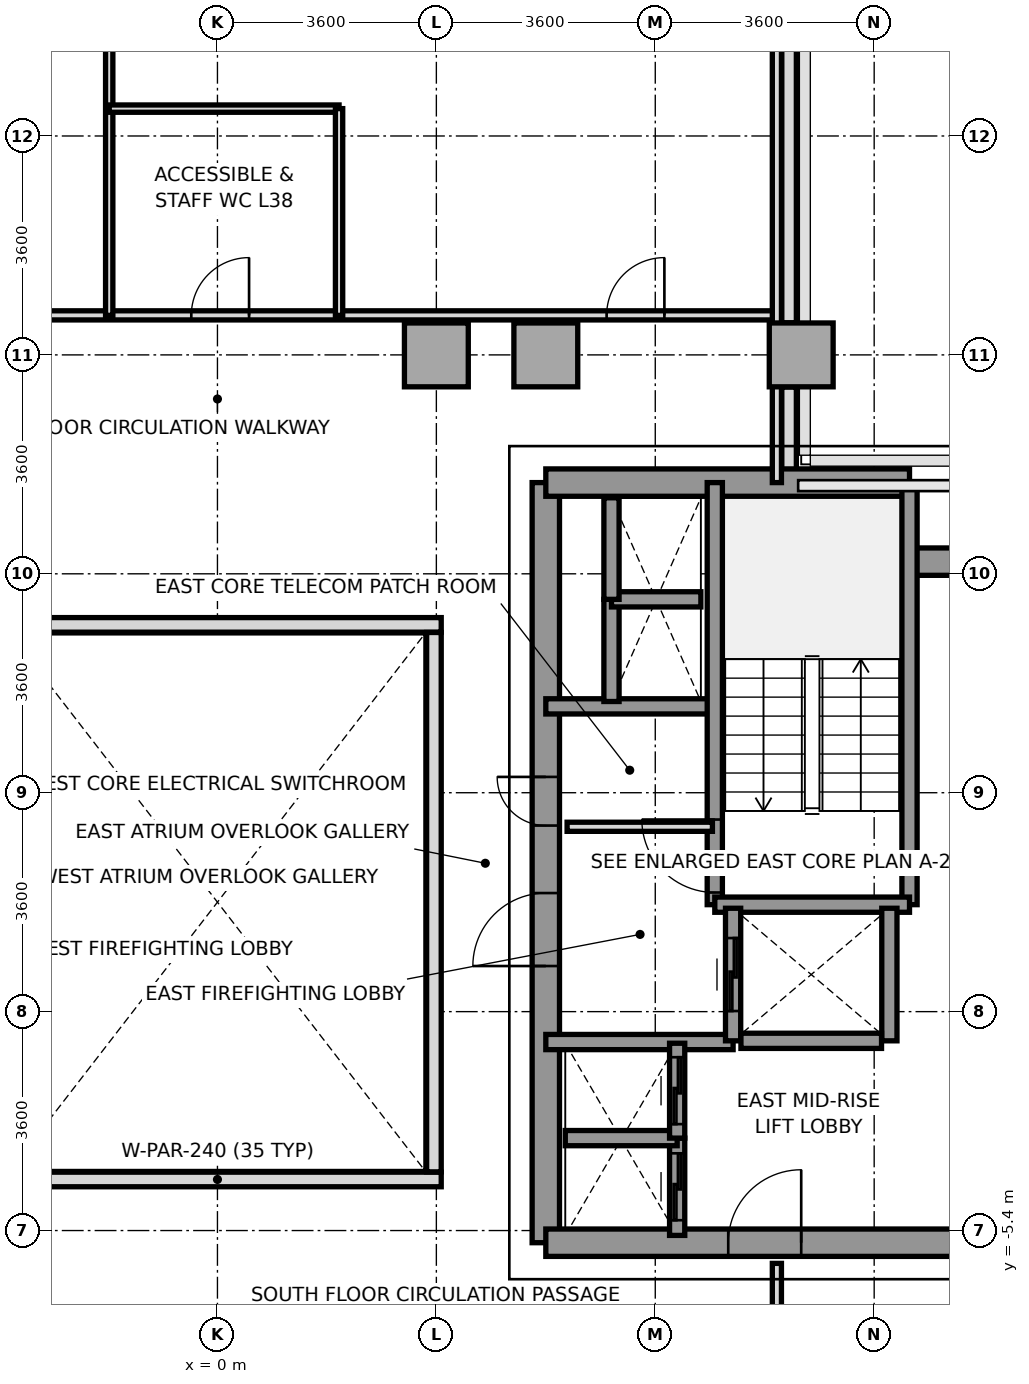
"""IFC4 building model, lengths in metres.
Left out: names, types, materials, properties, quantities, classifications, styles, units other than length and angle.
Written with IfcOpenShell. Run it as: python <this file> out.ifc"""

import sys

from ifc_helpers import new_model, si_unit, direction, frame, frame_2d, origin, origin_2d, place, context, subcontext, project, spatial, rectangle, extrude, source, transform, mapped, element, fill, save


model = new_model("IFC4")
c1 = context("Model", 3, precision=1e-05, world=origin(), true_north=direction((0.0, 1.0)))
c2 = subcontext(c1, "Body", "Model", "MODEL_VIEW")
j1 = project(units=[si_unit("LENGTHUNIT", "METRE"), si_unit("PLANEANGLEUNIT", "RADIAN")], contexts=[c1])
p1 = place(None, origin())
s1 = spatial("IfcSite", under=j1, at=p1, CompositionType="ELEMENT")
p2 = place(p1, origin())
s2 = spatial("IfcBuilding", under=s1, at=p2, CompositionType="ELEMENT")
p3 = place(p2, frame((0.0, 0.0, 141.4)))
s3 = spatial("IfcBuildingStorey", under=s2, at=p3, CompositionType="ELEMENT", Elevation=141.4)
m1 = source(origin(), c2, "Body", "SweptSolid", [
    extrude(rectangle(XDim=1.05, YDim=1.05, at=origin_2d()), origin(), (0.0, 0.0, 1.0), 3.2),
])
for number, where, z_axis, x_axis in (
    (1, (3.6, 9.0, 0.0), (0.0, 0.0, 1.0), (1.0, 0.0, 0.0)),
    (2, (5.4, 9.0, 0.0), (0.0, 0.0, 1.0), (1.0, 0.0, 0.0)),
    (3, (9.6, 9.0, 0.0), (0.0, 0.0, 1.0), (1.0, 0.0, 0.0)),
):
    element("IfcColumn", number, at=place(p3, frame(where, z_axis=z_axis, x_axis=x_axis)), inside=s3, PredefinedType="COLUMN", context=c2, shape_type="MappedRepresentation", body=[
        mapped(m1, transform((0.0, 0.0, 0.0), x_axis=(1.0, 0.0, 0.0), y_axis=(0.0, 1.0, 0.0), z_axis=(0.0, 0.0, 1.0), scale=1.0)),
    ])
p4 = place(p3, frame((9.4, 15.358, 0.0), z_axis=(0.0, 0.0, 1.0), x_axis=(0.0, -1.0, 0.0)))
e4 = element("IfcWall", 4, at=p4, inside=s3, PredefinedType="PARAPET", context=c2, shape_type="SweptSolid", body=[
    extrude(rectangle(XDim=5.83, YDim=0.24, at=frame_2d((2.915, 0.0))), origin(), (0.0, 0.0, 1.0), 1.15),
])
p5 = place(p3, frame((9.4, 8.472, 0.0), z_axis=(0.0, 0.0, 1.0), x_axis=(0.0, -1.0, 0.0)))
e5 = element("IfcWall", 5, at=p5, inside=s3, PredefinedType="PARAPET", context=c2, shape_type="SweptSolid", body=[
    extrude(rectangle(XDim=1.519, YDim=0.24, at=frame_2d((0.76, 0.0))), origin(), (0.0, 0.0, 1.0), 1.15),
])
p6 = place(p3, frame((5.4, -5.6, 0.0), z_axis=(0.0, 0.0, 1.0), x_axis=(0.0, 1.0, 0.0)))
e6 = element("IfcWall", 6, at=p6, inside=s3, PredefinedType="SHEAR", context=c2, shape_type="SweptSolid", body=[
    extrude(rectangle(XDim=12.5, YDim=0.45, at=frame_2d((6.25, 0.0))), origin(), (0.0, 0.0, 1.0), 3.2),
])
p7 = place(p6, frame((4.55, 0.0, 0.0)))
e7 = element("IfcOpeningElement", 7, at=p7, cuts=e6, PredefinedType="OPENING", context=c2, shape_type="SweptSolid", body=[
    extrude(rectangle(XDim=1.2, YDim=2.2, at=frame_2d((0.6, 1.1))), frame((0.0, 0.235, 0.0), z_axis=(0.0, -1.0, 0.0), x_axis=(1.0, 0.0, 0.0)), (0.0, 0.0, 1.0), 0.47),
])
p8 = place(p6, frame((6.86, 0.0, 0.0)))
e8 = element("IfcOpeningElement", 8, at=p8, cuts=e6, PredefinedType="OPENING", context=c2, shape_type="SweptSolid", body=[
    extrude(rectangle(XDim=0.8, YDim=2.1, at=frame_2d((0.4, 1.05))), frame((0.0, 0.235, 0.0), z_axis=(0.0, -1.0, 0.0), x_axis=(1.0, 0.0, 0.0)), (0.0, 0.0, 1.0), 0.47),
])
p9 = place(p3, frame((5.4, 6.9, 0.0), z_axis=(0.0, 0.0, 1.0), x_axis=(1.0, 0.0, 0.0)))
e9 = element("IfcWall", 9, at=p9, inside=s3, PredefinedType="SHEAR", context=c2, shape_type="SweptSolid", body=[
    extrude(rectangle(XDim=5.981, YDim=0.45, at=frame_2d((2.991, 0.0))), origin(), (0.0, 0.0, 1.0), 3.2),
])
p10 = place(p3, frame((11.381, 5.6, 0.0), z_axis=(0.0, 0.0, 1.0), x_axis=(1.0, 0.0, 0.0)))
e10 = element("IfcWall", 10, at=p10, inside=s3, PredefinedType="SHEAR", context=c2, shape_type="SweptSolid", body=[
    extrude(rectangle(XDim=1.819, YDim=0.45, at=frame_2d((0.909, 0.0))), origin(), (0.0, 0.0, 1.0), 3.2),
])
p11 = place(p3, frame((5.4, -5.6, 0.0), z_axis=(0.0, 0.0, 1.0), x_axis=(1.0, 0.0, 0.0)))
e11 = element("IfcWall", 11, at=p11, inside=s3, PredefinedType="SHEAR", context=c2, shape_type="SweptSolid", body=[
    extrude(rectangle(XDim=7.8, YDim=0.45, at=frame_2d((3.9, 0.0))), origin(), (0.0, 0.0, 1.0), 3.2),
])
p12 = place(p11, frame((3.0, 0.0, 0.0)))
e12 = element("IfcOpeningElement", 12, at=p12, cuts=e11, PredefinedType="OPENING", context=c2, shape_type="SweptSolid", body=[
    extrude(rectangle(XDim=1.2, YDim=2.2, at=frame_2d((0.6, 1.1))), frame((0.0, 0.235, 0.0), z_axis=(0.0, -1.0, 0.0), x_axis=(1.0, 0.0, 0.0)), (0.0, 0.0, 1.0), 0.47),
])
p13 = place(p3, frame((5.4, 3.22, 0.0), z_axis=(0.0, 0.0, 1.0), x_axis=(1.0, 0.0, 0.0)))
e13 = element("IfcWall", 13, at=p13, inside=s3, PredefinedType="SOLIDWALL", context=c2, shape_type="SweptSolid", body=[
    extrude(rectangle(XDim=2.78, YDim=0.25, at=frame_2d((1.39, 0.0))), origin(), (0.0, 0.0, 1.0), 3.2),
])
p14 = place(p3, frame((5.4, -2.3, 0.0), z_axis=(0.0, 0.0, 1.0), x_axis=(1.0, 0.0, 0.0)))
e14 = element("IfcWall", 14, at=p14, inside=s3, PredefinedType="SOLIDWALL", context=c2, shape_type="SweptSolid", body=[
    extrude(rectangle(XDim=3.08, YDim=0.25, at=frame_2d((1.54, 0.0))), origin(), (0.0, 0.0, 1.0), 3.2),
])
p15 = place(p3, frame((8.179, -0.041, 0.0), z_axis=(0.0, 0.0, 1.0), x_axis=(0.0, 1.0, 0.0)))
e15 = element("IfcWall", 15, at=p15, inside=s3, PredefinedType="SOLIDWALL", context=c2, shape_type="SweptSolid", body=[
    extrude(rectangle(XDim=6.941, YDim=0.25, at=frame_2d((3.47, 0.0))), origin(), (0.0, 0.0, 1.0), 3.2),
])
p16 = place(p15, frame((0.2, 0.0, 0.0)))
e16 = element("IfcOpeningElement", 16, at=p16, cuts=e15, PredefinedType="OPENING", context=c2, shape_type="SweptSolid", body=[
    extrude(rectangle(XDim=1.2, YDim=2.2, at=frame_2d((0.6, 1.1))), frame((0.0, 0.135, 0.0), z_axis=(0.0, -1.0, 0.0), x_axis=(1.0, 0.0, 0.0)), (0.0, 0.0, 1.0), 0.27),
])
p17 = place(p3, frame((11.381, -0.041, 0.0), z_axis=(0.0, 0.0, 1.0), x_axis=(0.0, 1.0, 0.0)))
e17 = element("IfcWall", 17, at=p17, inside=s3, PredefinedType="SOLIDWALL", context=c2, shape_type="SweptSolid", body=[
    extrude(rectangle(XDim=6.941, YDim=0.25, at=frame_2d((3.47, 0.0))), origin(), (0.0, 0.0, 1.0), 3.2),
])
p18 = place(p3, frame((8.179, -0.041, 0.0), z_axis=(0.0, 0.0, 1.0), x_axis=(1.0, 0.0, 0.0)))
e18 = element("IfcWall", 18, at=p18, inside=s3, PredefinedType="SOLIDWALL", context=c2, shape_type="SweptSolid", body=[
    extrude(rectangle(XDim=3.202, YDim=0.25, at=frame_2d((1.601, 0.0))), origin(), (0.0, 0.0, 1.0), 3.2),
])
p19 = place(p3, frame((8.48, -2.28, 0.0), z_axis=(0.0, 0.0, 1.0), x_axis=(0.0, 1.0, 0.0)))
e19 = element("IfcWall", 19, at=p19, inside=s3, PredefinedType="SOLIDWALL", context=c2, shape_type="SweptSolid", body=[
    extrude(rectangle(XDim=2.18, YDim=0.25, at=frame_2d((1.09, 0.0))), origin(), (0.0, 0.0, 1.0), 3.2),
])
p20 = place(p19, frame((0.49, 0.0, 0.0)))
e20 = element("IfcOpeningElement", 20, at=p20, cuts=e19, PredefinedType="OPENING", context=c2, shape_type="SweptSolid", body=[
    extrude(rectangle(XDim=1.2, YDim=2.2, at=frame_2d((0.6, 1.1))), frame((0.0, 0.135, 0.0), z_axis=(0.0, -1.0, 0.0), x_axis=(1.0, 0.0, 0.0)), (0.0, 0.0, 1.0), 0.27),
])
p21 = place(p3, frame((11.05, -2.28, 0.0), z_axis=(0.0, 0.0, 1.0), x_axis=(0.0, 1.0, 0.0)))
e21 = element("IfcWall", 21, at=p21, inside=s3, PredefinedType="SOLIDWALL", context=c2, shape_type="SweptSolid", body=[
    extrude(rectangle(XDim=2.18, YDim=0.25, at=frame_2d((1.09, 0.0))), origin(), (0.0, 0.0, 1.0), 3.2),
])
p22 = place(p3, frame((8.609, -2.28, 0.0), z_axis=(0.0, 0.0, 1.0), x_axis=(1.0, 0.0, 0.0)))
e22 = element("IfcWall", 22, at=p22, inside=s3, PredefinedType="SOLIDWALL", context=c2, shape_type="SweptSolid", body=[
    extrude(rectangle(XDim=2.312, YDim=0.25, at=frame_2d((1.156, 0.0))), origin(), (0.0, 0.0, 1.0), 3.2),
])
p23 = place(p3, frame((7.56, -5.48, 0.0), z_axis=(0.0, 0.0, 1.0), x_axis=(0.0, 1.0, 0.0)))
e23 = element("IfcWall", 23, at=p23, inside=s3, PredefinedType="SOLIDWALL", context=c2, shape_type="SweptSolid", body=[
    extrude(rectangle(XDim=1.6, YDim=0.25, at=frame_2d((0.8, 0.0))), origin(), (0.0, 0.0, 1.0), 3.2),
])
p24 = place(p23, frame((0.25, 0.0, 0.0)))
e24 = element("IfcOpeningElement", 24, at=p24, cuts=e23, PredefinedType="OPENING", context=c2, shape_type="SweptSolid", body=[
    extrude(rectangle(XDim=1.1, YDim=2.2, at=frame_2d((0.55, 1.1))), frame((0.0, 0.135, 0.0), z_axis=(0.0, -1.0, 0.0), x_axis=(1.0, 0.0, 0.0)), (0.0, 0.0, 1.0), 0.27),
])
p25 = place(p3, frame((5.72, -3.88, 0.0), z_axis=(0.0, 0.0, 1.0), x_axis=(1.0, 0.0, 0.0)))
e25 = element("IfcWall", 25, at=p25, inside=s3, PredefinedType="SOLIDWALL", context=c2, shape_type="SweptSolid", body=[
    extrude(rectangle(XDim=1.84, YDim=0.25, at=frame_2d((0.92, 0.0))), origin(), (0.0, 0.0, 1.0), 3.2),
])
p26 = place(p3, frame((7.56, -3.88, 0.0), z_axis=(0.0, 0.0, 1.0), x_axis=(0.0, 1.0, 0.0)))
e26 = element("IfcWall", 26, at=p26, inside=s3, PredefinedType="SOLIDWALL", context=c2, shape_type="SweptSolid", body=[
    extrude(rectangle(XDim=1.56, YDim=0.25, at=frame_2d((0.78, 0.0))), origin(), (0.0, 0.0, 1.0), 3.2),
])
p27 = place(p26, frame((0.23, 0.0, 0.0)))
e27 = element("IfcOpeningElement", 27, at=p27, cuts=e26, PredefinedType="OPENING", context=c2, shape_type="SweptSolid", body=[
    extrude(rectangle(XDim=1.1, YDim=2.2, at=frame_2d((0.55, 1.1))), frame((0.0, 0.135, 0.0), z_axis=(0.0, -1.0, 0.0), x_axis=(1.0, 0.0, 0.0)), (0.0, 0.0, 1.0), 0.27),
])
p28 = place(p3, frame((6.48, 3.3, 0.0), z_axis=(0.0, 0.0, 1.0), x_axis=(0.0, 1.0, 0.0)))
e28 = element("IfcWall", 28, at=p28, inside=s3, PredefinedType="SOLIDWALL", context=c2, shape_type="SweptSolid", body=[
    extrude(rectangle(XDim=1.68, YDim=0.25, at=frame_2d((0.84, 0.0))), origin(), (0.0, 0.0, 1.0), 3.2),
])
p29 = place(p3, frame((6.48, 4.98, 0.0), z_axis=(0.0, 0.0, 1.0), x_axis=(1.0, 0.0, 0.0)))
e29 = element("IfcWall", 29, at=p29, inside=s3, PredefinedType="SOLIDWALL", context=c2, shape_type="SweptSolid", body=[
    extrude(rectangle(XDim=1.47, YDim=0.25, at=frame_2d((0.735, 0.0))), origin(), (0.0, 0.0, 1.0), 3.2),
])
p30 = place(p3, frame((6.48, 4.98, 0.0), z_axis=(0.0, 0.0, 1.0), x_axis=(0.0, 1.0, 0.0)))
e30 = element("IfcWall", 30, at=p30, inside=s3, PredefinedType="SOLIDWALL", context=c2, shape_type="SweptSolid", body=[
    extrude(rectangle(XDim=1.67, YDim=0.25, at=frame_2d((0.835, 0.0))), origin(), (0.0, 0.0, 1.0), 3.2),
])
p31 = place(p3, frame((5.75, 1.24, 0.0), z_axis=(0.0, 0.0, 1.0), x_axis=(1.0, 0.0, 0.0)))
e31 = element("IfcWall", 31, at=p31, inside=s3, PredefinedType="PARTITIONING", context=c2, shape_type="SweptSolid", body=[
    extrude(rectangle(XDim=2.39, YDim=0.15, at=frame_2d((1.195, 0.0))), origin(), (0.0, 0.0, 1.0), 2.3),
])
p32 = place(p3, frame((-9.2, 9.65, 0.0), z_axis=(0.0, 0.0, 1.0), x_axis=(1.0, 0.0, 0.0)))
e32 = element("IfcWall", 32, at=p32, inside=s3, PredefinedType="PARTITIONING", context=c2, shape_type="SweptSolid", body=[
    extrude(rectangle(XDim=18.4, YDim=0.15, at=frame_2d((9.2, 0.0))), origin(), (0.0, 0.0, 1.0), 3.2),
])
p33 = place(p32, frame((8.77, 0.0, 0.0)))
e33 = element("IfcOpeningElement", 33, at=p33, cuts=e32, PredefinedType="OPENING", context=c2, shape_type="SweptSolid", body=[
    extrude(rectangle(XDim=0.95, YDim=2.15, at=frame_2d((0.475, 1.075))), frame((0.0, 0.085, 0.0), z_axis=(0.0, -1.0, 0.0), x_axis=(1.0, 0.0, 0.0)), (0.0, 0.0, 1.0), 0.17),
])
p34 = place(p32, frame((1.85, 0.0, 0.0)))
e34 = element("IfcOpeningElement", 34, at=p34, cuts=e32, PredefinedType="OPENING", context=c2, shape_type="SweptSolid", body=[
    extrude(rectangle(XDim=1.1, YDim=2.2, at=frame_2d((0.55, 1.1))), frame((0.0, 0.085, 0.0), z_axis=(0.0, -1.0, 0.0), x_axis=(1.0, 0.0, 0.0)), (0.0, 0.0, 1.0), 0.17),
])
p35 = place(p32, frame((15.6, 0.0, 0.0)))
e35 = element("IfcOpeningElement", 35, at=p35, cuts=e32, PredefinedType="OPENING", context=c2, shape_type="SweptSolid", body=[
    extrude(rectangle(XDim=0.95, YDim=2.15, at=frame_2d((0.475, 1.075))), frame((0.0, 0.085, 0.0), z_axis=(0.0, -1.0, 0.0), x_axis=(1.0, 0.0, 0.0)), (0.0, 0.0, 1.0), 0.17),
])
p36 = place(p3, frame((9.2, 6.9, 0.0), z_axis=(0.0, 0.0, 1.0), x_axis=(0.0, 1.0, 0.0)))
e36 = element("IfcWall", 36, at=p36, inside=s3, PredefinedType="PARTITIONING", context=c2, shape_type="SweptSolid", body=[
    extrude(rectangle(XDim=8.78, YDim=0.15, at=frame_2d((4.39, 0.0))), origin(), (0.0, 0.0, 1.0), 2.7),
])
p37 = place(p3, frame((-1.78, 9.65, 0.0), z_axis=(0.0, 0.0, 1.0), x_axis=(0.0, 1.0, 0.0)))
e37 = element("IfcWall", 37, at=p37, inside=s3, PredefinedType="PARTITIONING", context=c2, shape_type="SweptSolid", body=[
    extrude(rectangle(XDim=15.0, YDim=0.12, at=frame_2d((7.5, 0.0))), origin(), (0.0, 0.0, 1.0), 2.7),
])
p38 = place(p3, frame((-1.78, 13.05, 0.0), z_axis=(0.0, 0.0, 1.0), x_axis=(1.0, 0.0, 0.0)))
e38 = element("IfcWall", 38, at=p38, inside=s3, PredefinedType="PARTITIONING", context=c2, shape_type="SweptSolid", body=[
    extrude(rectangle(XDim=3.78, YDim=0.12, at=frame_2d((1.89, 0.0))), origin(), (0.0, 0.0, 1.0), 3.2),
])
p39 = place(p3, frame((2.0, 9.65, 0.0), z_axis=(0.0, 0.0, 1.0), x_axis=(0.0, 1.0, 0.0)))
e39 = element("IfcWall", 39, at=p39, inside=s3, PredefinedType="PARTITIONING", context=c2, shape_type="SweptSolid", body=[
    extrude(rectangle(XDim=3.4, YDim=0.12, at=frame_2d((1.7, 0.0))), origin(), (0.0, 0.0, 1.0), 3.2),
])
p40 = place(p3, frame((9.2, -15.68, 0.0), z_axis=(0.0, 0.0, 1.0), x_axis=(0.0, 1.0, 0.0)))
e40 = element("IfcWall", 40, at=p40, inside=s3, PredefinedType="PARTITIONING", context=c2, shape_type="SweptSolid", body=[
    extrude(rectangle(XDim=9.74, YDim=0.15, at=frame_2d((4.87, 0.0))), origin(), (0.0, 0.0, 1.0), 2.7),
])
for number, where, z_axis, x_axis in (
    (41, (-3.68, -4.56, 0.0), (0.0, 0.0, 1.0), (1.0, 0.0, 0.0)),
    (42, (-3.68, 4.56, 0.0), (0.0, 0.0, 1.0), (1.0, 0.0, 0.0)),
):
    element("IfcWall", number, at=place(p3, frame(where, z_axis=z_axis, x_axis=x_axis)), inside=s3, PredefinedType="PARAPET", context=c2, shape_type="SweptSolid", body=[
        extrude(rectangle(XDim=7.36, YDim=0.24, at=frame_2d((3.68, 0.0))), origin(), (0.0, 0.0, 1.0), 1.15),
    ])
p41 = place(p3, frame((3.56, -4.435, 0.0), z_axis=(0.0, 0.0, 1.0), x_axis=(0.0, 1.0, 0.0)))
e43 = element("IfcWall", 43, at=p41, inside=s3, PredefinedType="PARAPET", context=c2, shape_type="SweptSolid", body=[
    extrude(rectangle(XDim=8.87, YDim=0.24, at=frame_2d((4.435, 0.0))), origin(), (0.0, 0.0, 1.0), 1.15),
])
m2 = source(origin(), c2, "Body", "SweptSolid", [
    extrude(rectangle(XDim=1.2, YDim=2.2, at=frame_2d((0.6, 1.1))), frame((0.0, 0.025, 0.0), z_axis=(0.0, -1.0, 0.0), x_axis=(1.0, 0.0, 0.0)), (0.0, 0.0, 1.0), 0.05),
])
p42 = place(p16, origin())
e44 = element("IfcDoor", 44, at=p42, inside=s3, OperationType="SINGLE_SWING_RIGHT", PredefinedType="DOOR", context=c2, shape_type="MappedRepresentation", body=[
    mapped(m2, transform((0.0, 0.0, 0.0), x_axis=(1.0, 0.0, 0.0), y_axis=(0.0, 1.0, 0.0), z_axis=(0.0, 0.0, 1.0), scale=1.0)),
])
fill(e16, e44)
p43 = place(p7, origin())
e45 = element("IfcDoor", 45, at=p43, inside=s3, OperationType="SINGLE_SWING_LEFT", PredefinedType="DOOR", context=c2, shape_type="MappedRepresentation", body=[
    mapped(m2, transform((0.0, 0.0, 0.0), x_axis=(1.0, 0.0, 0.0), y_axis=(0.0, 1.0, 0.0), z_axis=(0.0, 0.0, 1.0), scale=1.0)),
])
fill(e7, e45)
p44 = place(p12, origin())
e46 = element("IfcDoor", 46, at=p44, inside=s3, OperationType="SINGLE_SWING_RIGHT", PredefinedType="DOOR", context=c2, shape_type="MappedRepresentation", body=[
    mapped(m2, transform((0.0, 0.0, 0.0), x_axis=(1.0, 0.0, 0.0), y_axis=(0.0, 1.0, 0.0), z_axis=(0.0, 0.0, 1.0), scale=1.0)),
])
fill(e12, e46)
m3 = source(origin(), c2, "Body", "SweptSolid", [
    extrude(rectangle(XDim=0.8, YDim=2.1, at=frame_2d((0.4, 1.05))), frame((0.0, 0.025, 0.0), z_axis=(0.0, -1.0, 0.0), x_axis=(1.0, 0.0, 0.0)), (0.0, 0.0, 1.0), 0.05),
])
p45 = place(p8, origin())
e47 = element("IfcDoor", 47, at=p45, inside=s3, OperationType="SINGLE_SWING_RIGHT", PredefinedType="DOOR", context=c2, shape_type="MappedRepresentation", body=[
    mapped(m3, transform((0.0, 0.0, 0.0), x_axis=(1.0, 0.0, 0.0), y_axis=(0.0, 1.0, 0.0), z_axis=(0.0, 0.0, 1.0), scale=1.0)),
])
fill(e8, e47)
p46 = place(p20, origin())
e48 = element("IfcDoor", 48, at=p46, inside=s3, OperationType="SLIDING_TO_RIGHT", PredefinedType="DOOR", context=c2, shape_type="MappedRepresentation", body=[
    mapped(m2, transform((0.0, 0.0, 0.0), x_axis=(1.0, 0.0, 0.0), y_axis=(0.0, 1.0, 0.0), z_axis=(0.0, 0.0, 1.0), scale=1.0)),
])
fill(e20, e48)
m4 = source(origin(), c2, "Body", "SweptSolid", [
    extrude(rectangle(XDim=1.1, YDim=2.2, at=frame_2d((0.55, 1.1))), frame((0.0, 0.025, 0.0), z_axis=(0.0, -1.0, 0.0), x_axis=(1.0, 0.0, 0.0)), (0.0, 0.0, 1.0), 0.05),
])
p47 = place(p24, origin())
e49 = element("IfcDoor", 49, at=p47, inside=s3, OperationType="SLIDING_TO_LEFT", PredefinedType="DOOR", context=c2, shape_type="MappedRepresentation", body=[
    mapped(m4, transform((0.0, 0.0, 0.0), x_axis=(1.0, 0.0, 0.0), y_axis=(0.0, 1.0, 0.0), z_axis=(0.0, 0.0, 1.0), scale=1.0)),
])
fill(e24, e49)
p48 = place(p27, origin())
e50 = element("IfcDoor", 50, at=p48, inside=s3, OperationType="SLIDING_TO_LEFT", PredefinedType="DOOR", context=c2, shape_type="MappedRepresentation", body=[
    mapped(m4, transform((0.0, 0.0, 0.0), x_axis=(1.0, 0.0, 0.0), y_axis=(0.0, 1.0, 0.0), z_axis=(0.0, 0.0, 1.0), scale=1.0)),
])
fill(e27, e50)
m5 = source(origin(), c2, "Body", "SweptSolid", [
    extrude(rectangle(XDim=0.95, YDim=2.15, at=frame_2d((0.475, 1.075))), frame((0.0, 0.025, 0.0), z_axis=(0.0, -1.0, 0.0), x_axis=(1.0, 0.0, 0.0)), (0.0, 0.0, 1.0), 0.05),
])
p49 = place(p33, origin())
e51 = element("IfcDoor", 51, at=p49, inside=s3, OperationType="SINGLE_SWING_RIGHT", PredefinedType="DOOR", context=c2, shape_type="MappedRepresentation", body=[
    mapped(m5, transform((0.0, 0.0, 0.0), x_axis=(1.0, 0.0, 0.0), y_axis=(0.0, 1.0, 0.0), z_axis=(0.0, 0.0, 1.0), scale=1.0)),
])
fill(e33, e51)
p50 = place(p35, origin())
e52 = element("IfcDoor", 52, at=p50, inside=s3, OperationType="SINGLE_SWING_RIGHT", PredefinedType="DOOR", context=c2, shape_type="MappedRepresentation", body=[
    mapped(m5, transform((0.0, 0.0, 0.0), x_axis=(1.0, 0.0, 0.0), y_axis=(0.0, 1.0, 0.0), z_axis=(0.0, 0.0, 1.0), scale=1.0)),
])
fill(e35, e52)
save(model, sys.argv[1])
